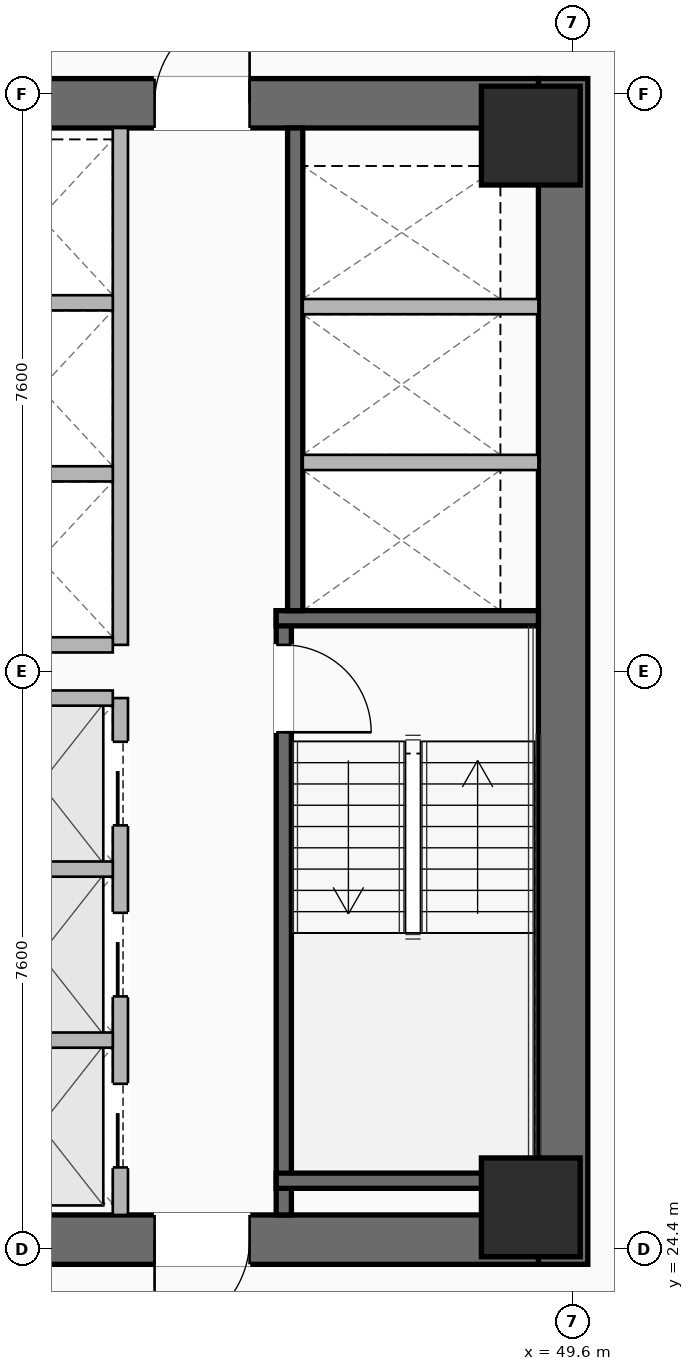
"""IFC4 building model, lengths in metres.
Left out: names, types, materials, properties, quantities, classifications, styles, units other than length and angle.
Written with IfcOpenShell. Run it as: python <this file> out.ifc"""

import sys

from ifc_helpers import new_model, si_unit, direction, frame, frame_2d, origin, origin_2d, place, context, subcontext, project, spatial, rectangle, hollow_rectangle, extrude, element, fill, save


model = new_model("IFC4")
c1 = context("Model", 3, precision=1e-05, world=origin(), true_north=direction((0.0, 1.0)))
c2 = subcontext(c1, "Body", "Model", "MODEL_VIEW")
j1 = project(units=[si_unit("LENGTHUNIT", "METRE"), si_unit("PLANEANGLEUNIT", "RADIAN")], contexts=[c1])
p1 = place(None, origin())
s1 = spatial("IfcSite", under=j1, at=p1, CompositionType="ELEMENT")
p2 = place(p1, origin())
s2 = spatial("IfcBuilding", under=s1, at=p2, CompositionType="ELEMENT")
p3 = place(p2, frame((0.0, 0.0, 56.55)))
s3 = spatial("IfcBuildingStorey", under=s2, at=p3, CompositionType="ELEMENT", Elevation=56.55)
p4 = place(p3, frame((49.475, 39.8, 0.0), z_axis=(0.0, 0.0, 1.0), x_axis=(0.0, -1.0, 0.0)))
e1 = element("IfcWall", 1, at=p4, inside=s3, PredefinedType="SHEAR", context=c2, shape_type="SweptSolid", body=[
    extrude(rectangle(XDim=15.6, YDim=0.65, at=frame_2d((7.8, 0.0))), origin(), (0.0, 0.0, 1.0), 3.55),
])
p5 = place(p3, frame((49.15, 24.525, 0.0), z_axis=(0.0, 0.0, 1.0), x_axis=(-1.0, 0.0, 0.0)))
e2 = element("IfcWall", 2, at=p5, inside=s3, PredefinedType="SHEAR", context=c2, shape_type="SweptSolid", body=[
    extrude(rectangle(XDim=14.3, YDim=0.65, at=frame_2d((7.15, 0.0))), origin(), (0.0, 0.0, 1.0), 3.55),
])
p6 = place(p5, frame((8.85, 0.0, 0.0)))
e3 = element("IfcOpeningElement", 3, at=p6, cuts=e2, PredefinedType="OPENING", context=c2, shape_type="SweptSolid", body=[
    extrude(rectangle(XDim=1.25, YDim=2.25, at=frame_2d((0.625, 1.125))), frame((0.0, 0.335, 0.0), z_axis=(0.0, -1.0, 0.0), x_axis=(1.0, 0.0, 0.0)), (0.0, 0.0, 1.0), 0.67),
])
p7 = place(p5, frame((3.8, 0.0, 0.0)))
e4 = element("IfcOpeningElement", 4, at=p7, cuts=e2, PredefinedType="OPENING", context=c2, shape_type="SweptSolid", body=[
    extrude(rectangle(XDim=1.25, YDim=2.25, at=frame_2d((0.625, 1.125))), frame((0.0, 0.335, 0.0), z_axis=(0.0, -1.0, 0.0), x_axis=(1.0, 0.0, 0.0)), (0.0, 0.0, 1.0), 0.67),
])
p8 = place(p3, frame((34.85, 39.475, 0.0), z_axis=(0.0, 0.0, 1.0), x_axis=(1.0, 0.0, 0.0)))
e5 = element("IfcWall", 5, at=p8, inside=s3, PredefinedType="SHEAR", context=c2, shape_type="SweptSolid", body=[
    extrude(rectangle(XDim=14.3, YDim=0.65, at=frame_2d((7.15, 0.0))), origin(), (0.0, 0.0, 1.0), 3.55),
])
p9 = place(p8, frame((4.2, 0.0, 0.0)))
e6 = element("IfcOpeningElement", 6, at=p9, cuts=e5, PredefinedType="OPENING", context=c2, shape_type="SweptSolid", body=[
    extrude(rectangle(XDim=1.25, YDim=2.25, at=frame_2d((0.625, 1.125))), frame((0.0, 0.335, 0.0), z_axis=(0.0, -1.0, 0.0), x_axis=(1.0, 0.0, 0.0)), (0.0, 0.0, 1.0), 0.67),
])
p10 = place(p8, frame((9.25, 0.0, 0.0)))
e7 = element("IfcOpeningElement", 7, at=p10, cuts=e5, PredefinedType="OPENING", context=c2, shape_type="SweptSolid", body=[
    extrude(rectangle(XDim=1.25, YDim=2.25, at=frame_2d((0.625, 1.125))), frame((0.0, 0.335, 0.0), z_axis=(0.0, -1.0, 0.0), x_axis=(1.0, 0.0, 0.0)), (0.0, 0.0, 1.0), 0.67),
])
for number, where, z_axis, x_axis in (
    (8, (49.05, 24.95, 0.0), (0.0, 0.0, 1.0), (1.0, 0.0, 0.0)),
    (9, (49.05, 39.05, 0.0), (0.0, 0.0, 1.0), (1.0, 0.0, 0.0)),
):
    element("IfcColumn", number, at=place(p3, frame(where, z_axis=z_axis, x_axis=x_axis)), inside=s3, PredefinedType="COLUMN", context=c2, shape_type="SweptSolid", body=[
        extrude(hollow_rectangle(XDim=1.3, YDim=1.3, WallThickness=0.05, at=origin_2d()), origin(), (0.0, 0.0, 1.0), 3.35),
    ])
p11 = place(p3, frame((45.8, 32.8, 0.0), z_axis=(0.0, 0.0, 1.0), x_axis=(0.0, -1.0, 0.0)))
e10 = element("IfcWall", 10, at=p11, inside=s3, PredefinedType="SHEAR", context=c2, shape_type="SweptSolid", body=[
    extrude(rectangle(XDim=7.95, YDim=0.2, at=frame_2d((3.975, 0.0))), origin(), (0.0, 0.0, 1.0), 3.35),
])
p12 = place(p11, frame((0.45, 0.0, 0.0)))
e11 = element("IfcOpeningElement", 11, at=p12, cuts=e10, PredefinedType="OPENING", context=c2, shape_type="SweptSolid", body=[
    extrude(rectangle(XDim=1.15, YDim=2.2, at=frame_2d((0.575, 1.1))), frame((0.0, 0.11, 0.0), z_axis=(0.0, -1.0, 0.0), x_axis=(1.0, 0.0, 0.0)), (0.0, 0.0, 1.0), 0.22),
])
for number, where, z_axis, x_axis in (
    (12, (45.7, 32.7, 0.0), (0.0, 0.0, 1.0), (1.0, 0.0, 0.0)),
    (13, (45.7, 25.3, 0.0), (0.0, 0.0, 1.0), (1.0, 0.0, 0.0)),
):
    element("IfcWall", number, at=place(p3, frame(where, z_axis=z_axis, x_axis=x_axis)), inside=s3, PredefinedType="SHEAR", context=c2, shape_type="SweptSolid", body=[
        extrude(rectangle(XDim=3.45, YDim=0.2, at=frame_2d((1.725, 0.0))), origin(), (0.0, 0.0, 1.0), 3.35),
    ])
p13 = place(p3, frame((45.95, 39.15, 0.0), z_axis=(0.0, 0.0, 1.0), x_axis=(0.0, -1.0, 0.0)))
e14 = element("IfcWall", 14, at=p13, inside=s3, PredefinedType="SHEAR", context=c2, shape_type="SweptSolid", body=[
    extrude(rectangle(XDim=6.35, YDim=0.2, at=frame_2d((3.175, 0.0))), origin(), (0.0, 0.0, 1.0), 3.35),
])
for number, where, z_axis, x_axis in (
    (15, (46.05, 34.75, 0.0), (0.0, 0.0, 1.0), (1.0, 0.0, 0.0)),
    (16, (46.05, 36.8, 0.0), (0.0, 0.0, 1.0), (1.0, 0.0, 0.0)),
):
    element("IfcWall", number, at=place(p3, frame(where, z_axis=z_axis, x_axis=x_axis)), inside=s3, PredefinedType="SOLIDWALL", context=c2, shape_type="SweptSolid", body=[
        extrude(rectangle(XDim=3.1, YDim=0.2, at=frame_2d((1.55, 0.0))), origin(), (0.0, 0.0, 1.0), 3.35),
    ])
p14 = place(p3, frame((43.65, 24.85, 0.0), z_axis=(0.0, 0.0, 1.0), x_axis=(0.0, 1.0, 0.0)))
e17 = element("IfcWall", 17, at=p14, inside=s3, PredefinedType="SOLIDWALL", context=c2, shape_type="SweptSolid", body=[
    extrude(rectangle(XDim=6.8, YDim=0.2, at=frame_2d((3.4, 0.0))), origin(), (0.0, 0.0, 1.0), 3.35),
])
p15 = place(p14, frame((0.625, 0.0, 0.0)))
e18 = element("IfcOpeningElement", 18, at=p15, cuts=e17, PredefinedType="OPENING", context=c2, shape_type="SweptSolid", body=[
    extrude(rectangle(XDim=1.1, YDim=2.2, at=frame_2d((0.55, 1.1))), frame((0.0, 0.11, 0.0), z_axis=(0.0, -1.0, 0.0), x_axis=(1.0, 0.0, 0.0)), (0.0, 0.0, 1.0), 0.22),
])
p16 = place(p14, frame((2.875, 0.0, 0.0)))
e19 = element("IfcOpeningElement", 19, at=p16, cuts=e17, PredefinedType="OPENING", context=c2, shape_type="SweptSolid", body=[
    extrude(rectangle(XDim=1.1, YDim=2.2, at=frame_2d((0.55, 1.1))), frame((0.0, 0.11, 0.0), z_axis=(0.0, -1.0, 0.0), x_axis=(1.0, 0.0, 0.0)), (0.0, 0.0, 1.0), 0.22),
])
p17 = place(p14, frame((5.125, 0.0, 0.0)))
e20 = element("IfcOpeningElement", 20, at=p17, cuts=e17, PredefinedType="OPENING", context=c2, shape_type="SweptSolid", body=[
    extrude(rectangle(XDim=1.1, YDim=2.2, at=frame_2d((0.55, 1.1))), frame((0.0, 0.11, 0.0), z_axis=(0.0, -1.0, 0.0), x_axis=(1.0, 0.0, 0.0)), (0.0, 0.0, 1.0), 0.22),
])
for number, where, z_axis, x_axis in (
    (21, (41.67, 27.15, 0.0), (0.0, 0.0, 1.0), (1.0, 0.0, 0.0)),
    (22, (41.67, 29.4, 0.0), (0.0, 0.0, 1.0), (1.0, 0.0, 0.0)),
    (23, (41.67, 31.65, 0.0), (0.0, 0.0, 1.0), (1.0, 0.0, 0.0)),
):
    element("IfcWall", number, at=place(p3, frame(where, z_axis=z_axis, x_axis=x_axis)), inside=s3, PredefinedType="SOLIDWALL", context=c2, shape_type="SweptSolid", body=[
        extrude(rectangle(XDim=1.88, YDim=0.2, at=frame_2d((0.94, 0.0))), origin(), (0.0, 0.0, 1.0), 3.35),
    ])
p18 = place(p3, frame((43.65, 32.35, 0.0), z_axis=(0.0, 0.0, 1.0), x_axis=(0.0, 1.0, 0.0)))
e24 = element("IfcWall", 24, at=p18, inside=s3, PredefinedType="SOLIDWALL", context=c2, shape_type="SweptSolid", body=[
    extrude(rectangle(XDim=6.8, YDim=0.2, at=frame_2d((3.4, 0.0))), origin(), (0.0, 0.0, 1.0), 3.35),
])
for number, where, z_axis, x_axis in (
    (25, (41.67, 32.35, 0.0), (0.0, 0.0, 1.0), (1.0, 0.0, 0.0)),
    (26, (41.67, 34.6, 0.0), (0.0, 0.0, 1.0), (1.0, 0.0, 0.0)),
    (27, (41.67, 36.85, 0.0), (0.0, 0.0, 1.0), (1.0, 0.0, 0.0)),
):
    element("IfcWall", number, at=place(p3, frame(where, z_axis=z_axis, x_axis=x_axis)), inside=s3, PredefinedType="SOLIDWALL", context=c2, shape_type="SweptSolid", body=[
        extrude(rectangle(XDim=1.88, YDim=0.2, at=frame_2d((0.94, 0.0))), origin(), (0.0, 0.0, 1.0), 3.35),
    ])
p19 = place(p10, origin())
e28 = element("IfcDoor", 28, at=p19, inside=s3, OperationType="SINGLE_SWING_RIGHT", PredefinedType="DOOR", context=c2, shape_type="SweptSolid", body=[
    extrude(rectangle(XDim=1.25, YDim=2.25, at=frame_2d((0.625, 1.125))), frame((0.0, 0.025, 0.0), z_axis=(0.0, -1.0, 0.0), x_axis=(1.0, 0.0, 0.0)), (0.0, 0.0, 1.0), 0.05),
])
fill(e7, e28)
p20 = place(p7, origin())
e29 = element("IfcDoor", 29, at=p20, inside=s3, OperationType="SINGLE_SWING_RIGHT", PredefinedType="DOOR", context=c2, shape_type="SweptSolid", body=[
    extrude(rectangle(XDim=1.25, YDim=2.25, at=frame_2d((0.625, 1.125))), frame((0.0, 0.025, 0.0), z_axis=(0.0, -1.0, 0.0), x_axis=(1.0, 0.0, 0.0)), (0.0, 0.0, 1.0), 0.05),
])
fill(e4, e29)
p21 = place(p12, origin())
e30 = element("IfcDoor", 30, at=p21, inside=s3, OperationType="SINGLE_SWING_RIGHT", PredefinedType="DOOR", context=c2, shape_type="SweptSolid", body=[
    extrude(rectangle(XDim=1.15, YDim=2.2, at=frame_2d((0.575, 1.1))), frame((0.0, 0.025, 0.0), z_axis=(0.0, -1.0, 0.0), x_axis=(1.0, 0.0, 0.0)), (0.0, 0.0, 1.0), 0.05),
])
fill(e11, e30)
p22 = place(p15, origin())
e31 = element("IfcDoor", 31, at=p22, inside=s3, OperationType="SLIDING_TO_LEFT", PredefinedType="DOOR", context=c2, shape_type="SweptSolid", body=[
    extrude(rectangle(XDim=1.1, YDim=2.2, at=frame_2d((0.55, 1.1))), frame((0.0, 0.025, 0.0), z_axis=(0.0, -1.0, 0.0), x_axis=(1.0, 0.0, 0.0)), (0.0, 0.0, 1.0), 0.05),
])
fill(e18, e31)
p23 = place(p16, origin())
e32 = element("IfcDoor", 32, at=p23, inside=s3, OperationType="SLIDING_TO_LEFT", PredefinedType="DOOR", context=c2, shape_type="SweptSolid", body=[
    extrude(rectangle(XDim=1.1, YDim=2.2, at=frame_2d((0.55, 1.1))), frame((0.0, 0.025, 0.0), z_axis=(0.0, -1.0, 0.0), x_axis=(1.0, 0.0, 0.0)), (0.0, 0.0, 1.0), 0.05),
])
fill(e19, e32)
p24 = place(p17, origin())
e33 = element("IfcDoor", 33, at=p24, inside=s3, OperationType="SLIDING_TO_LEFT", PredefinedType="DOOR", context=c2, shape_type="SweptSolid", body=[
    extrude(rectangle(XDim=1.1, YDim=2.2, at=frame_2d((0.55, 1.1))), frame((0.0, 0.025, 0.0), z_axis=(0.0, -1.0, 0.0), x_axis=(1.0, 0.0, 0.0)), (0.0, 0.0, 1.0), 0.05),
])
fill(e20, e33)
save(model, sys.argv[1])
